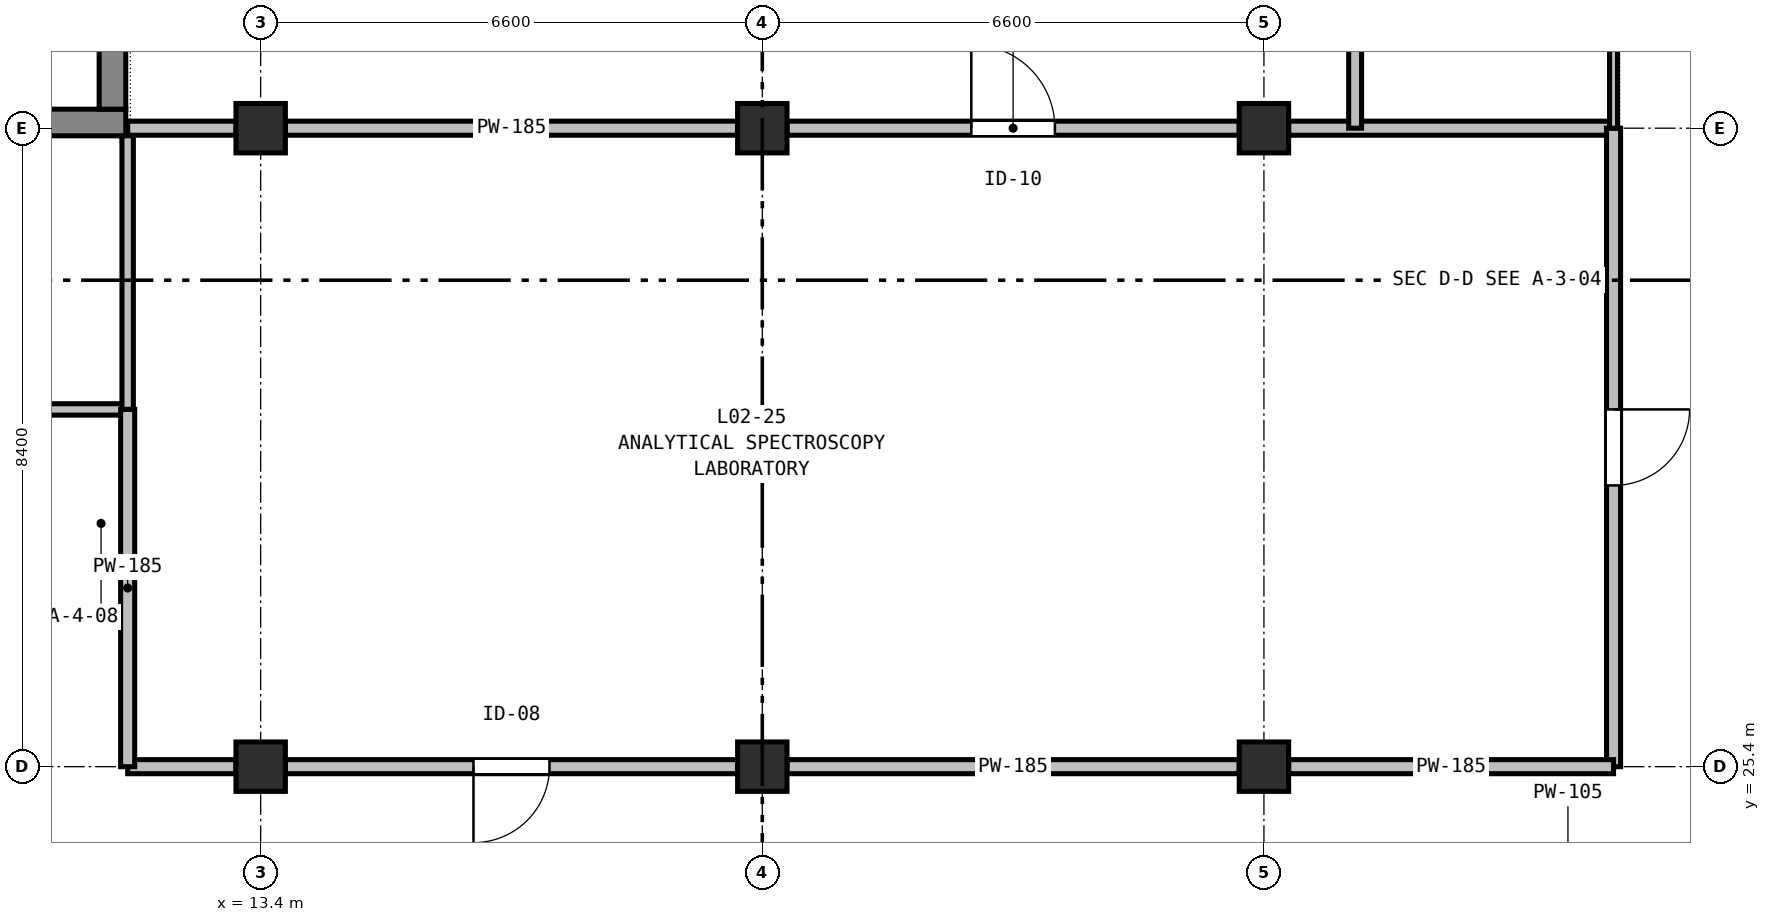
"""IFC4 building model, lengths in metres.
Left out: names, types, materials, properties, quantities, classifications, styles, units other than length and angle.
Written with IfcOpenShell. Run it as: python <this file> out.ifc"""

import sys

from ifc_helpers import new_model, si_unit, direction, frame, frame_2d, origin, origin_2d, place, context, subcontext, project, spatial, rectangle, extrude, element, fill, save


model = new_model("IFC4")
c1 = context("Model", 3, precision=1e-05, world=origin(), true_north=direction((0.0, 1.0)))
c2 = subcontext(c1, "Body", "Model", "MODEL_VIEW")
j1 = project(units=[si_unit("LENGTHUNIT", "METRE"), si_unit("PLANEANGLEUNIT", "RADIAN")], contexts=[c1])
p1 = place(None, origin())
s1 = spatial("IfcSite", under=j1, at=p1, CompositionType="ELEMENT")
p2 = place(p1, origin())
s2 = spatial("IfcBuilding", under=s1, at=p2, CompositionType="ELEMENT")
p3 = place(p2, frame((0.0, 0.0, 10.2)))
s3 = spatial("IfcBuildingStorey", under=s2, at=p3, CompositionType="ELEMENT", Elevation=10.2)
for number, where, z_axis, x_axis in (
    (1, (13.4, 25.4, 0.0), (0.0, 0.0, 1.0), (1.0, 0.0, 0.0)),
    (2, (13.4, 33.8, 0.0), (0.0, 0.0, 1.0), (1.0, 0.0, 0.0)),
    (3, (20.0, 25.4, 0.0), (0.0, 0.0, 1.0), (1.0, 0.0, 0.0)),
    (4, (20.0, 33.8, 0.0), (0.0, 0.0, 1.0), (1.0, 0.0, 0.0)),
    (5, (26.6, 25.4, 0.0), (0.0, 0.0, 1.0), (1.0, 0.0, 0.0)),
    (6, (26.6, 33.8, 0.0), (0.0, 0.0, 1.0), (1.0, 0.0, 0.0)),
):
    element("IfcColumn", number, at=place(p3, frame(where, z_axis=z_axis, x_axis=x_axis)), inside=s3, PredefinedType="COLUMN", context=c2, shape_type="SweptSolid", body=[
        extrude(rectangle(XDim=0.65, YDim=0.65, at=origin_2d()), origin(), (0.0, 0.0, 1.0), 4.8),
    ])
p4 = place(p3, frame((7.875, 33.875, 0.0), z_axis=(0.0, 0.0, 1.0), x_axis=(1.0, 0.0, 0.0)))
e7 = element("IfcWall", 7, at=p4, inside=s3, PredefinedType="SHEAR", context=c2, shape_type="SweptSolid", body=[
    extrude(rectangle(XDim=3.75, YDim=0.35, at=frame_2d((1.875, 0.0))), origin(), (0.0, 0.0, 1.0), 4.8),
])
p5 = place(p4, frame((1.3, 0.0, 0.0)))
e8 = element("IfcOpeningElement", 8, at=p5, cuts=e7, PredefinedType="OPENING", context=c2, shape_type="SweptSolid", body=[
    extrude(rectangle(XDim=1.15, YDim=2.15, at=frame_2d((0.575, 1.075))), frame((0.0, 0.185, 0.0), z_axis=(0.0, -1.0, 0.0), x_axis=(1.0, 0.0, 0.0)), (0.0, 0.0, 1.0), 0.37),
])
p6 = place(p3, frame((11.45, 34.05, 0.0), z_axis=(0.0, 0.0, 1.0), x_axis=(0.0, 1.0, 0.0)))
e9 = element("IfcWall", 9, at=p6, inside=s3, PredefinedType="SHEAR", context=c2, shape_type="SweptSolid", body=[
    extrude(rectangle(XDim=7.275, YDim=0.35, at=frame_2d((3.637, 0.0))), origin(), (0.0, 0.0, 1.0), 4.8),
])
p7 = place(p3, frame((11.65, 30.1, 0.0), z_axis=(0.0, 0.0, 1.0), x_axis=(-1.0, 0.0, 0.0)))
e10 = element("IfcWall", 10, at=p7, inside=s3, PredefinedType="PARTITIONING", context=c2, shape_type="SweptSolid", body=[
    extrude(rectangle(XDim=4.548, YDim=0.15, at=frame_2d((2.274, 0.0))), origin(), (0.0, 0.0, 1.0), 4.085),
])
p8 = place(p7, frame((1.774, 0.0, 0.0)))
e11 = element("IfcOpeningElement", 11, at=p8, cuts=e10, PredefinedType="OPENING", context=c2, shape_type="SweptSolid", body=[
    extrude(rectangle(XDim=1.0, YDim=2.1, at=frame_2d((0.5, 1.05))), frame((0.0, 0.085, 0.0), z_axis=(0.0, -1.0, 0.0), x_axis=(1.0, 0.0, 0.0)), (0.0, 0.0, 1.0), 0.17),
])
p9 = place(p3, frame((11.65, 33.7, 0.0), z_axis=(0.0, 0.0, 1.0), x_axis=(0.0, -1.0, 0.0)))
e12 = element("IfcWall", 12, at=p9, inside=s3, PredefinedType="PARTITIONING", context=c2, shape_type="SweptSolid", body=[
    extrude(rectangle(XDim=3.6, YDim=0.15, at=frame_2d((1.8, 0.0))), origin(), (0.0, 0.0, 1.0), 4.135),
])
p10 = place(p3, frame((11.65, 33.8, 0.0), z_axis=(0.0, 0.0, 1.0), x_axis=(1.0, 0.0, 0.0)))
e13 = element("IfcWall", 13, at=p10, inside=s3, PredefinedType="PARTITIONING", context=c2, shape_type="SweptSolid", body=[
    extrude(rectangle(XDim=1.425, YDim=0.185, at=frame_2d((0.712, 0.0))), origin(), (0.0, 0.0, 1.0), 4.135),
])
p11 = place(p3, frame((13.725, 33.8, 0.0), z_axis=(0.0, 0.0, 1.0), x_axis=(1.0, 0.0, 0.0)))
e14 = element("IfcWall", 14, at=p11, inside=s3, PredefinedType="PARTITIONING", context=c2, shape_type="SweptSolid", body=[
    extrude(rectangle(XDim=5.95, YDim=0.185, at=frame_2d((2.975, 0.0))), origin(), (0.0, 0.0, 1.0), 4.135),
])
p12 = place(p3, frame((20.325, 33.8, 0.0), z_axis=(0.0, 0.0, 1.0), x_axis=(1.0, 0.0, 0.0)))
e15 = element("IfcWall", 15, at=p12, inside=s3, PredefinedType="PARTITIONING", context=c2, shape_type="SweptSolid", body=[
    extrude(rectangle(XDim=5.95, YDim=0.185, at=frame_2d((2.975, 0.0))), origin(), (0.0, 0.0, 1.0), 4.135),
])
p13 = place(p12, frame((2.425, 0.0, 0.0)))
e16 = element("IfcOpeningElement", 16, at=p13, cuts=e15, PredefinedType="OPENING", context=c2, shape_type="SweptSolid", body=[
    extrude(rectangle(XDim=1.1, YDim=2.06, at=frame_2d((0.55, 1.03))), frame((0.0, 0.103, 0.0), z_axis=(0.0, -1.0, 0.0), x_axis=(1.0, 0.0, 0.0)), (0.0, 0.0, 1.0), 0.205),
])
p14 = place(p3, frame((26.925, 33.8, 0.0), z_axis=(0.0, 0.0, 1.0), x_axis=(1.0, 0.0, 0.0)))
e17 = element("IfcWall", 17, at=p14, inside=s3, PredefinedType="PARTITIONING", context=c2, shape_type="SweptSolid", body=[
    extrude(rectangle(XDim=4.275, YDim=0.185, at=frame_2d((2.137, 0.0))), origin(), (0.0, 0.0, 1.0), 4.135),
])
p15 = place(p3, frame((31.2, 33.8, 0.0), z_axis=(0.0, 0.0, 1.0), x_axis=(0.0, -1.0, 0.0)))
e18 = element("IfcWall", 18, at=p15, inside=s3, PredefinedType="PARTITIONING", context=c2, shape_type="SweptSolid", body=[
    extrude(rectangle(XDim=8.4, YDim=0.185, at=frame_2d((4.2, 0.0))), origin(), (0.0, 0.0, 1.0), 4.135),
])
p16 = place(p15, frame((3.7, 0.0, 0.0)))
e19 = element("IfcOpeningElement", 19, at=p16, cuts=e18, PredefinedType="OPENING", context=c2, shape_type="SweptSolid", body=[
    extrude(rectangle(XDim=1.0, YDim=2.06, at=frame_2d((0.5, 1.03))), frame((0.0, 0.103, 0.0), z_axis=(0.0, -1.0, 0.0), x_axis=(1.0, 0.0, 0.0)), (0.0, 0.0, 1.0), 0.205),
])
p17 = place(p3, frame((31.2, 25.4, 0.0), z_axis=(0.0, 0.0, 1.0), x_axis=(-1.0, 0.0, 0.0)))
e20 = element("IfcWall", 20, at=p17, inside=s3, PredefinedType="PARTITIONING", context=c2, shape_type="SweptSolid", body=[
    extrude(rectangle(XDim=4.275, YDim=0.185, at=frame_2d((2.137, 0.0))), origin(), (0.0, 0.0, 1.0), 4.135),
])
p18 = place(p3, frame((26.275, 25.4, 0.0), z_axis=(0.0, 0.0, 1.0), x_axis=(-1.0, 0.0, 0.0)))
e21 = element("IfcWall", 21, at=p18, inside=s3, PredefinedType="PARTITIONING", context=c2, shape_type="SweptSolid", body=[
    extrude(rectangle(XDim=5.95, YDim=0.185, at=frame_2d((2.975, 0.0))), origin(), (0.0, 0.0, 1.0), 4.135),
])
p19 = place(p3, frame((19.675, 25.4, 0.0), z_axis=(0.0, 0.0, 1.0), x_axis=(-1.0, 0.0, 0.0)))
e22 = element("IfcWall", 22, at=p19, inside=s3, PredefinedType="PARTITIONING", context=c2, shape_type="SweptSolid", body=[
    extrude(rectangle(XDim=5.95, YDim=0.185, at=frame_2d((2.975, 0.0))), origin(), (0.0, 0.0, 1.0), 4.135),
])
p20 = place(p19, frame((2.475, 0.0, 0.0)))
e23 = element("IfcOpeningElement", 23, at=p20, cuts=e22, PredefinedType="OPENING", context=c2, shape_type="SweptSolid", body=[
    extrude(rectangle(XDim=1.0, YDim=2.06, at=frame_2d((0.5, 1.03))), frame((0.0, 0.103, 0.0), z_axis=(0.0, -1.0, 0.0), x_axis=(1.0, 0.0, 0.0)), (0.0, 0.0, 1.0), 0.205),
])
p21 = place(p3, frame((13.075, 25.4, 0.0), z_axis=(0.0, 0.0, 1.0), x_axis=(-1.0, 0.0, 0.0)))
e24 = element("IfcWall", 24, at=p21, inside=s3, PredefinedType="PARTITIONING", context=c2, shape_type="SweptSolid", body=[
    extrude(rectangle(XDim=1.425, YDim=0.185, at=frame_2d((0.712, 0.0))), origin(), (0.0, 0.0, 1.0), 4.135),
])
p22 = place(p3, frame((11.65, 25.4, 0.0), z_axis=(0.0, 0.0, 1.0), x_axis=(0.0, 1.0, 0.0)))
e25 = element("IfcWall", 25, at=p22, inside=s3, PredefinedType="PARTITIONING", context=c2, shape_type="SweptSolid", body=[
    extrude(rectangle(XDim=4.7, YDim=0.185, at=frame_2d((2.35, 0.0))), origin(), (0.0, 0.0, 1.0), 4.135),
])
p23 = place(p3, frame((27.8, 42.02, 0.0), z_axis=(0.0, 0.0, 1.0), x_axis=(0.0, -1.0, 0.0)))
e26 = element("IfcWall", 26, at=p23, inside=s3, PredefinedType="PARTITIONING", context=c2, shape_type="SweptSolid", body=[
    extrude(rectangle(XDim=8.22, YDim=0.17, at=frame_2d((4.11, 0.0))), origin(), (0.0, 0.0, 1.0), 4.085),
])
p24 = place(p23, frame((3.56, 0.0, 0.0)))
e27 = element("IfcOpeningElement", 27, at=p24, cuts=e26, PredefinedType="OPENING", context=c2, shape_type="SweptSolid", body=[
    extrude(rectangle(XDim=1.1, YDim=2.06, at=frame_2d((0.55, 1.03))), frame((0.0, 0.095, 0.0), z_axis=(0.0, -1.0, 0.0), x_axis=(1.0, 0.0, 0.0)), (0.0, 0.0, 1.0), 0.19),
])
p25 = place(p3, frame((31.2, 42.02, 0.0), z_axis=(0.0, 0.0, 1.0), x_axis=(0.0, -1.0, 0.0)))
e28 = element("IfcWall", 28, at=p25, inside=s3, PredefinedType="PARTITIONING", context=c2, shape_type="SweptSolid", body=[
    extrude(rectangle(XDim=8.22, YDim=0.105, at=frame_2d((4.11, 0.0))), origin(), (0.0, 0.0, 1.0), 4.085),
])
p26 = place(p25, frame((3.35, 0.0, 0.0)))
e29 = element("IfcOpeningElement", 29, at=p26, cuts=e28, PredefinedType="OPENING", context=c2, shape_type="SweptSolid", body=[
    extrude(rectangle(XDim=1.52, YDim=2.14, at=frame_2d((0.76, 1.07))), frame((0.0, 0.062, 0.0), z_axis=(0.0, -1.0, 0.0), x_axis=(1.0, 0.0, 0.0)), (0.0, 0.0, 1.0), 0.125),
])
p27 = place(p16, origin())
e30 = element("IfcDoor", 30, at=p27, inside=s3, OperationType="SINGLE_SWING_LEFT", PredefinedType="DOOR", context=c2, shape_type="SweptSolid", body=[
    extrude(rectangle(XDim=1.0, YDim=2.06, at=frame_2d((0.5, 1.03))), frame((0.0, 0.025, 0.0), z_axis=(0.0, -1.0, 0.0), x_axis=(1.0, 0.0, 0.0)), (0.0, 0.0, 1.0), 0.05),
])
fill(e19, e30)
p28 = place(p20, origin())
e31 = element("IfcDoor", 31, at=p28, inside=s3, OperationType="SINGLE_SWING_RIGHT", PredefinedType="DOOR", context=c2, shape_type="SweptSolid", body=[
    extrude(rectangle(XDim=1.0, YDim=2.06, at=frame_2d((0.5, 1.03))), frame((0.0, 0.025, 0.0), z_axis=(0.0, -1.0, 0.0), x_axis=(1.0, 0.0, 0.0)), (0.0, 0.0, 1.0), 0.05),
])
fill(e23, e31)
p29 = place(p13, origin())
e32 = element("IfcDoor", 32, at=p29, inside=s3, OperationType="SINGLE_SWING_LEFT", PredefinedType="DOOR", context=c2, shape_type="SweptSolid", body=[
    extrude(rectangle(XDim=1.1, YDim=2.06, at=frame_2d((0.55, 1.03))), frame((0.0, 0.025, 0.0), z_axis=(0.0, -1.0, 0.0), x_axis=(1.0, 0.0, 0.0)), (0.0, 0.0, 1.0), 0.05),
])
fill(e16, e32)
save(model, sys.argv[1])
